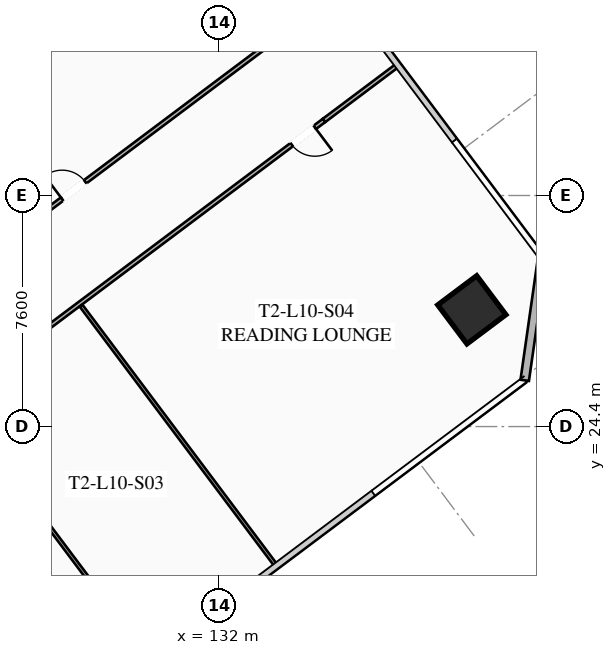
"""IFC4 building model, lengths in metres.
Left out: names, types, materials, properties, quantities, classifications, styles, units other than length and angle.
Written with IfcOpenShell. Run it as: python <this file> out.ifc"""

import sys

from ifc_helpers import new_model, si_unit, direction, frame, frame_2d, origin, origin_2d, place, context, subcontext, project, spatial, rectangle, hollow_rectangle, extrude, element, fill, save


model = new_model("IFC4")
c1 = context("Model", 3, precision=1e-05, world=origin(), true_north=direction((0.0, 1.0)))
c2 = subcontext(c1, "Body", "Model", "MODEL_VIEW")
j1 = project(units=[si_unit("LENGTHUNIT", "METRE"), si_unit("PLANEANGLEUNIT", "RADIAN")], contexts=[c1])
p1 = place(None, origin())
s1 = spatial("IfcSite", under=j1, at=p1, CompositionType="ELEMENT")
p2 = place(p1, origin())
s2 = spatial("IfcBuilding", under=s1, at=p2, CompositionType="ELEMENT")
p3 = place(p2, frame((0.0, 0.0, 42.35)))
s3 = spatial("IfcBuildingStorey", under=s2, at=p3, CompositionType="ELEMENT", Elevation=42.35)
p4 = place(p3, frame((140.32, 28.24, 0.0), z_axis=(0.0, 0.0, 1.0), x_axis=(0.799999996291, 0.600000004945, 0.0)))
e1 = element("IfcColumn", 1, at=p4, inside=s3, PredefinedType="COLUMN", context=c2, shape_type="SweptSolid", body=[
    extrude(hollow_rectangle(XDim=1.6, YDim=1.6, WallThickness=0.06, at=origin_2d()), origin(), (0.0, 0.0, 1.0), 3.35),
])
p5 = place(p3, frame((142.64, 29.98, 0.0), z_axis=(0.0, 0.0, 1.0), x_axis=(-0.14137968631, -0.989955445613, 0.0)))
e2 = element("IfcWall", 2, at=p5, inside=s3, PredefinedType="SOLIDWALL", context=c2, shape_type="SweptSolid", body=[
    extrude(rectangle(XDim=4.101, YDim=0.28, at=frame_2d((2.051, 0.0))), origin(), (0.0, 0.0, 1.0), 3.35),
])
p6 = place(p3, frame((135.46, 34.47, 0.0), z_axis=(0.0, 0.0, 1.0), x_axis=(-0.800000982127, -0.599998690494, 0.0)))
e3 = element("IfcWall", 3, at=p6, inside=s3, PredefinedType="PARTITIONING", context=c2, shape_type="SweptSolid", body=[
    extrude(rectangle(XDim=29.83, YDim=0.135, at=frame_2d((14.915, 0.0))), origin(), (0.0, 0.0, 1.0), 2.703),
])
p7 = place(p6, frame((28.5, 0.0, 0.0)))
e4 = element("IfcOpeningElement", 4, at=p7, cuts=e3, PredefinedType="OPENING", context=c2, shape_type="SweptSolid", body=[
    extrude(rectangle(XDim=0.95, YDim=2.05, at=frame_2d((0.475, 1.025))), frame((0.0, 0.077, 0.0), z_axis=(0.0, -1.0, 0.0), x_axis=(1.0, 0.0, 0.0)), (0.0, 0.0, 1.0), 0.155),
])
p8 = place(p6, frame((17.901, 0.0, 0.0)))
e5 = element("IfcOpeningElement", 5, at=p8, cuts=e3, PredefinedType="OPENING", context=c2, shape_type="SweptSolid", body=[
    extrude(rectangle(XDim=0.95, YDim=2.05, at=frame_2d((0.475, 1.025))), frame((0.0, 0.077, 0.0), z_axis=(0.0, -1.0, 0.0), x_axis=(1.0, 0.0, 0.0)), (0.0, 0.0, 1.0), 0.155),
])
p9 = place(p6, frame((13.92, 0.0, 0.0)))
e6 = element("IfcOpeningElement", 6, at=p9, cuts=e3, PredefinedType="OPENING", context=c2, shape_type="SweptSolid", body=[
    extrude(rectangle(XDim=0.95, YDim=2.05, at=frame_2d((0.475, 1.025))), frame((0.0, 0.077, 0.0), z_axis=(0.0, -1.0, 0.0), x_axis=(1.0, 0.0, 0.0)), (0.0, 0.0, 1.0), 0.155),
])
p10 = place(p6, frame((0.38, 0.0, 0.0)))
e7 = element("IfcOpeningElement", 7, at=p10, cuts=e3, PredefinedType="OPENING", context=c2, shape_type="SweptSolid", body=[
    extrude(rectangle(XDim=0.95, YDim=2.05, at=frame_2d((0.475, 1.025))), frame((0.0, 0.077, 0.0), z_axis=(0.0, -1.0, 0.0), x_axis=(1.0, 0.0, 0.0)), (0.0, 0.0, 1.0), 0.155),
])
p11 = place(p3, frame((135.46, 34.47, 0.0), z_axis=(0.0, 0.0, 1.0), x_axis=(0.799990331366, 0.600012891296, 0.0)))
e8 = element("IfcWall", 8, at=p11, inside=s3, PredefinedType="PARTITIONING", context=c2, shape_type="SweptSolid", body=[
    extrude(rectangle(XDim=3.03, YDim=0.135, at=frame_2d((1.515, 0.0))), origin(), (0.0, 0.0, 1.0), 2.703),
])
for number, where, z_axis, x_axis in (
    (9, (129.728, 16.696, 0.0), (0.0, 0.0, 1.0), (-0.6, 0.8, 0.0)),
    (10, (133.888, 19.816, 0.0), (0.0, 0.0, 1.0), (-0.6, 0.8, 0.0)),
):
    element("IfcWall", number, at=place(p3, frame(where, z_axis=z_axis, x_axis=x_axis)), inside=s3, PredefinedType="PARTITIONING", context=c2, shape_type="SweptSolid", body=[
        extrude(rectangle(XDim=10.7, YDim=0.11, at=frame_2d((5.35, 0.0))), origin(), (0.0, 0.0, 1.0), 2.703),
    ])
p12 = place(p3, frame((125.208, 30.656, 0.0), z_axis=(0.0, 0.0, 1.0), x_axis=(0.800002191231, 0.599997078347, 0.0)))
e11 = element("IfcWall", 11, at=p12, inside=s3, PredefinedType="PARTITIONING", context=c2, shape_type="SweptSolid", body=[
    extrude(rectangle(XDim=13.37, YDim=0.135, at=frame_2d((6.685, 0.0))), origin(), (0.0, 0.0, 1.0), 2.703),
])
p13 = place(p12, frame((2.045, 0.0, 0.0)))
e12 = element("IfcOpeningElement", 12, at=p13, cuts=e11, PredefinedType="OPENING", context=c2, shape_type="SweptSolid", body=[
    extrude(rectangle(XDim=0.95, YDim=2.05, at=frame_2d((0.475, 1.025))), frame((0.0, 0.077, 0.0), z_axis=(0.0, -1.0, 0.0), x_axis=(1.0, 0.0, 0.0)), (0.0, 0.0, 1.0), 0.155),
])
p14 = place(p10, origin())
e13 = element("IfcDoor", 13, at=p14, inside=s3, OperationType="SINGLE_SWING_LEFT", PredefinedType="DOOR", context=c2, shape_type="SweptSolid", body=[
    extrude(rectangle(XDim=0.95, YDim=2.05, at=frame_2d((0.475, 1.025))), frame((0.0, 0.025, 0.0), z_axis=(0.0, -1.0, 0.0), x_axis=(1.0, 0.0, 0.0)), (0.0, 0.0, 1.0), 0.05),
])
fill(e7, e13)
p15 = place(p13, origin())
e14 = element("IfcDoor", 14, at=p15, inside=s3, OperationType="SINGLE_SWING_LEFT", PredefinedType="DOOR", context=c2, shape_type="SweptSolid", body=[
    extrude(rectangle(XDim=0.95, YDim=2.05, at=frame_2d((0.475, 1.025))), frame((0.0, 0.025, 0.0), z_axis=(0.0, -1.0, 0.0), x_axis=(1.0, 0.0, 0.0)), (0.0, 0.0, 1.0), 0.05),
])
fill(e12, e14)
save(model, sys.argv[1])
